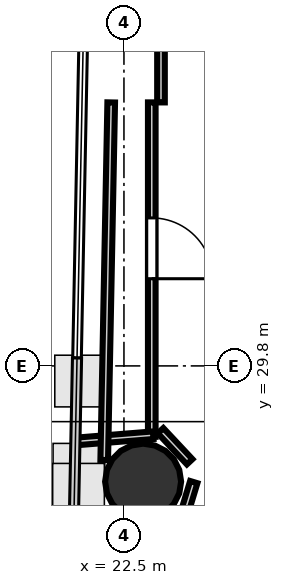
"""IFC4 building model, lengths in metres.
Left out: names, types, materials, properties, quantities, classifications, styles, units other than length and angle.
Written with IfcOpenShell. Run it as: python <this file> out.ifc"""

import sys

from ifc_helpers import new_model, si_unit, direction, frame, frame_2d, origin, origin_2d, place, context, subcontext, project, spatial, rectangle, hollow_circle, extrude, element, fill, save


model = new_model("IFC4")
c1 = context("Model", 3, precision=1e-05, world=origin(), true_north=direction((0.0, 1.0)))
c2 = subcontext(c1, "Body", "Model", "MODEL_VIEW")
j1 = project(units=[si_unit("LENGTHUNIT", "METRE"), si_unit("PLANEANGLEUNIT", "RADIAN")], contexts=[c1])
p1 = place(None, origin())
s1 = spatial("IfcSite", under=j1, at=p1, CompositionType="ELEMENT")
p2 = place(p1, origin())
s2 = spatial("IfcBuilding", under=s1, at=p2, CompositionType="ELEMENT")
p3 = place(p2, frame((0.0, 0.0, 138.5)))
s3 = spatial("IfcBuildingStorey", under=s2, at=p3, CompositionType="ELEMENT", Elevation=138.5)
p4 = place(p3, frame((22.878, 27.516, 0.0), z_axis=(0.0, 0.0, 1.0), x_axis=(1.0, 0.0, 0.0)))
e1 = element("IfcColumn", 1, at=p4, inside=s3, PredefinedType="COLUMN", context=c2, shape_type="SweptSolid", body=[
    extrude(hollow_circle(Radius=0.75, WallThickness=0.036, at=origin_2d()), origin(), (0.0, 0.0, 1.0), 4.6),
])
p5 = place(p3, frame((23.049, 35.0, 0.0), z_axis=(0.0, 0.0, 1.0), x_axis=(0.0, -1.0, 0.0)))
e2 = element("IfcWall", 2, at=p5, inside=s3, PredefinedType="PARTITIONING", context=c2, shape_type="SweptSolid", body=[
    extrude(rectangle(XDim=6.599, YDim=0.15, at=frame_2d((3.299, 0.0))), origin(), (0.0, 0.0, 1.0), 2.9),
])
p6 = place(p5, frame((2.28, 0.0, 0.0)))
e3 = element("IfcOpeningElement", 3, at=p6, cuts=e2, PredefinedType="OPENING", context=c2, shape_type="SweptSolid", body=[
    extrude(rectangle(XDim=1.2, YDim=2.15, at=frame_2d((0.6, 1.075))), frame((0.0, 0.085, 0.0), z_axis=(0.0, -1.0, 0.0), x_axis=(1.0, 0.0, 0.0)), (0.0, 0.0, 1.0), 0.17),
])
p7 = place(p3, frame((23.077, 28.432, 0.0), z_axis=(0.0, 0.0, 1.0), x_axis=(-0.99676233756, -0.080404243802, 0.0)))
e4 = element("IfcWall", 4, at=p7, inside=s3, PredefinedType="PARTITIONING", context=c2, shape_type="SweptSolid", body=[
    extrude(rectangle(XDim=1.561, YDim=0.15, at=frame_2d((0.78, 0.0))), origin(), (0.0, 0.0, 1.0), 2.9),
])
p8 = place(p3, frame((22.111, 27.943, 0.0), z_axis=(0.0, 0.0, 1.0), x_axis=(0.019544409896, 0.999808989778, 0.0)))
e5 = element("IfcWall", 5, at=p8, inside=s3, PredefinedType="PARTITIONING", context=c2, shape_type="SweptSolid", body=[
    extrude(rectangle(XDim=7.058, YDim=0.15, at=frame_2d((3.529, 0.0))), origin(), (0.0, 0.0, 1.0), 2.9),
])
p9 = place(p3, frame((23.797, 27.908, 0.0), z_axis=(0.0, 0.0, 1.0), x_axis=(-0.683477006845, 0.729972041324, 0.0)))
e6 = element("IfcWall", 6, at=p9, inside=s3, PredefinedType="PARTITIONING", context=c2, shape_type="SweptSolid", body=[
    extrude(rectangle(XDim=0.84, YDim=0.15, at=frame_2d((0.42, 0.0))), origin(), (0.0, 0.0, 1.0), 2.9),
])
p10 = place(p3, frame((23.231, 35.0, 0.0), z_axis=(0.0, 0.0, 1.0), x_axis=(0.0, 1.0, 0.0)))
e7 = element("IfcWall", 7, at=p10, inside=s3, PredefinedType="PARTITIONING", context=c2, shape_type="SweptSolid", body=[
    extrude(rectangle(XDim=4.503, YDim=0.15, at=frame_2d((2.251, 0.0))), origin(), (0.0, 0.0, 1.0), 2.9),
])
p11 = place(p3, frame((23.714, 26.968, 0.0), z_axis=(0.0, 0.0, 1.0), x_axis=(0.29036822543, 0.956914987687, 0.0)))
e8 = element("IfcWall", 8, at=p11, inside=s3, PredefinedType="PARTITIONING", context=c2, shape_type="SweptSolid", body=[
    extrude(rectangle(XDim=0.563, YDim=0.15, at=frame_2d((0.282, 0.0))), origin(), (0.0, 0.0, 1.0), 2.9),
])
p12 = place(p6, origin())
e9 = element("IfcDoor", 9, at=p12, inside=s3, OperationType="SINGLE_SWING_RIGHT", PredefinedType="DOOR", context=c2, shape_type="SweptSolid", body=[
    extrude(rectangle(XDim=1.2, YDim=2.15, at=frame_2d((0.6, 1.075))), frame((0.0, 0.025, 0.0), z_axis=(0.0, -1.0, 0.0), x_axis=(1.0, 0.0, 0.0)), (0.0, 0.0, 1.0), 0.05),
])
fill(e3, e9)
save(model, sys.argv[1])
